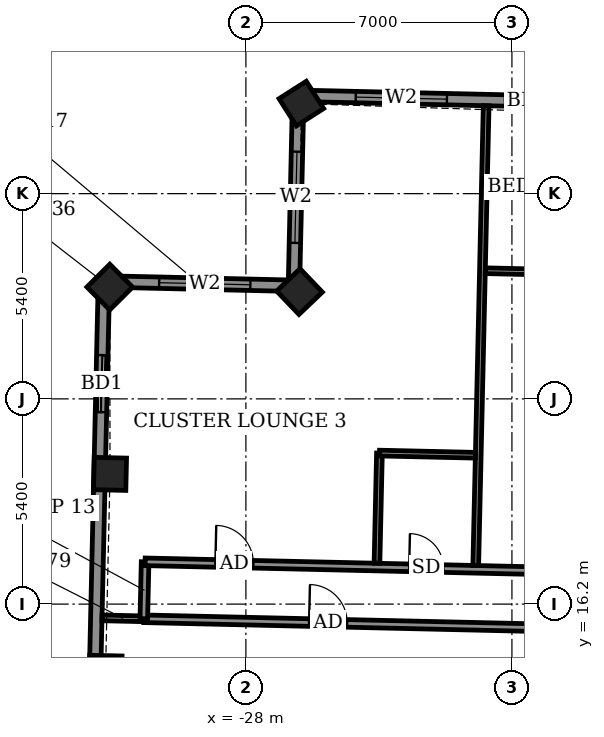
"""IFC4 building model, lengths in metres.
Left out: names, types, materials, properties, quantities, classifications, styles, units other than length and angle.
Written with IfcOpenShell. Run it as: python <this file> out.ifc"""

import sys

from ifc_helpers import new_model, si_unit, direction, frame, frame_2d, origin, origin_2d, place, context, subcontext, project, spatial, rectangle, extrude, element, fill, save


model = new_model("IFC4")
c1 = context("Model", 3, precision=1e-05, world=origin(), true_north=direction((0.0, 1.0)))
c2 = subcontext(c1, "Body", "Model", "MODEL_VIEW")
j1 = project(units=[si_unit("LENGTHUNIT", "METRE"), si_unit("PLANEANGLEUNIT", "RADIAN")], contexts=[c1])
p1 = place(None, origin())
s1 = spatial("IfcSite", under=j1, at=p1, CompositionType="ELEMENT")
p2 = place(p1, origin())
s2 = spatial("IfcBuilding", under=s1, at=p2, CompositionType="ELEMENT")
p3 = place(p2, frame((0.0, 0.0, 316.9)))
s3 = spatial("IfcBuildingStorey", under=s2, at=p3, CompositionType="ELEMENT", Elevation=316.9)
for number, where, z_axis, x_axis in (
    (1, (-26.541, 29.37, -0.55), (0.0, 0.0, 1.0), (-0.843, -0.538, 0.0)),
    (2, (-26.589, 24.423, -0.55), (0.0, 0.0, 1.0), (-0.723, -0.691, 0.0)),
    (3, (-31.582, 24.542, -0.55), (0.0, 0.0, 1.0), (-0.709, -0.706, 0.0)),
    (4, (-31.575, 19.626, -0.55), (0.0, 0.0, 1.0), (-0.023, -1.0, 0.0)),
    (5, (-31.693, 14.419, -0.55), (0.0, 0.0, 1.0), (-0.023, -1.0, 0.0)),
):
    element("IfcColumn", number, at=place(p3, frame(where, z_axis=z_axis, x_axis=x_axis)), inside=s3, PredefinedType="COLUMN", context=c2, shape_type="SweptSolid", body=[
        extrude(rectangle(XDim=0.85, YDim=0.85, at=origin_2d()), origin(), (0.0, 0.0, 1.0), 3.6),
    ])
p4 = place(p3, frame((25.264, 28.397, 0.0), z_axis=(0.0, 0.0, 1.0), x_axis=(-0.999742391375, 0.022696935658, 0.0)))
e6 = element("IfcWall", 6, at=p4, inside=s3, PredefinedType="SOLIDWALL", context=c2, shape_type="SweptSolid", body=[
    extrude(rectangle(XDim=51.9, YDim=0.3, at=frame_2d((25.95, 0.0))), origin(), (0.0, 0.0, 1.0), 2.45),
])
p5 = place(p4, frame((0.874, 0.0, 0.0)))
e7 = element("IfcOpeningElement", 7, at=p5, cuts=e6, PredefinedType="OPENING", context=c2, shape_type="SweptSolid", body=[
    extrude(rectangle(XDim=1.5, YDim=2.4, at=frame_2d((0.75, 1.2))), frame((0.0, 0.16, 0.0), z_axis=(0.0, -1.0, 0.0), x_axis=(1.0, 0.0, 0.0)), (0.0, 0.0, 1.0), 0.32),
])
p6 = place(p4, frame((4.241, 0.0, 0.0)))
e8 = element("IfcOpeningElement", 8, at=p6, cuts=e6, PredefinedType="OPENING", context=c2, shape_type="SweptSolid", body=[
    extrude(rectangle(XDim=1.5, YDim=2.4, at=frame_2d((0.75, 1.2))), frame((0.0, 0.16, 0.0), z_axis=(0.0, -1.0, 0.0), x_axis=(1.0, 0.0, 0.0)), (0.0, 0.0, 1.0), 0.32),
])
p7 = place(p4, frame((8.691, 0.0, 0.0)))
e9 = element("IfcOpeningElement", 9, at=p7, cuts=e6, PredefinedType="OPENING", context=c2, shape_type="SweptSolid", body=[
    extrude(rectangle(XDim=1.5, YDim=2.4, at=frame_2d((0.75, 1.2))), frame((0.0, 0.16, 0.0), z_axis=(0.0, -1.0, 0.0), x_axis=(1.0, 0.0, 0.0)), (0.0, 0.0, 1.0), 0.32),
])
p8 = place(p4, frame((12.245, 0.0, 0.0)))
e10 = element("IfcOpeningElement", 10, at=p8, cuts=e6, PredefinedType="OPENING", context=c2, shape_type="SweptSolid", body=[
    extrude(rectangle(XDim=1.5, YDim=2.4, at=frame_2d((0.75, 1.2))), frame((0.0, 0.16, 0.0), z_axis=(0.0, -1.0, 0.0), x_axis=(1.0, 0.0, 0.0)), (0.0, 0.0, 1.0), 0.32),
])
p9 = place(p4, frame((17.25, 0.0, 0.0)))
e11 = element("IfcOpeningElement", 11, at=p9, cuts=e6, PredefinedType="OPENING", context=c2, shape_type="SweptSolid", body=[
    extrude(rectangle(XDim=1.5, YDim=2.4, at=frame_2d((0.75, 1.2))), frame((0.0, 0.16, 0.0), z_axis=(0.0, -1.0, 0.0), x_axis=(1.0, 0.0, 0.0)), (0.0, 0.0, 1.0), 0.32),
])
p10 = place(p4, frame((22.874, 0.0, 0.0)))
e12 = element("IfcOpeningElement", 12, at=p10, cuts=e6, PredefinedType="OPENING", context=c2, shape_type="SweptSolid", body=[
    extrude(rectangle(XDim=1.2, YDim=2.4, at=frame_2d((0.6, 1.2))), frame((0.0, 0.16, 0.0), z_axis=(0.0, -1.0, 0.0), x_axis=(1.0, 0.0, 0.0)), (0.0, 0.0, 1.0), 0.32),
])
p11 = place(p4, frame((26.1, 0.0, 0.0)))
e13 = element("IfcOpeningElement", 13, at=p11, cuts=e6, PredefinedType="OPENING", context=c2, shape_type="SweptSolid", body=[
    extrude(rectangle(XDim=1.5, YDim=2.4, at=frame_2d((0.75, 1.2))), frame((0.0, 0.16, 0.0), z_axis=(0.0, -1.0, 0.0), x_axis=(1.0, 0.0, 0.0)), (0.0, 0.0, 1.0), 0.32),
])
p12 = place(p4, frame((30.977, 0.0, 0.0)))
e14 = element("IfcOpeningElement", 14, at=p12, cuts=e6, PredefinedType="OPENING", context=c2, shape_type="SweptSolid", body=[
    extrude(rectangle(XDim=1.5, YDim=2.4, at=frame_2d((0.75, 1.2))), frame((0.0, 0.16, 0.0), z_axis=(0.0, -1.0, 0.0), x_axis=(1.0, 0.0, 0.0)), (0.0, 0.0, 1.0), 0.32),
])
p13 = place(p4, frame((34.53, 0.0, 0.0)))
e15 = element("IfcOpeningElement", 15, at=p13, cuts=e6, PredefinedType="OPENING", context=c2, shape_type="SweptSolid", body=[
    extrude(rectangle(XDim=1.5, YDim=2.4, at=frame_2d((0.75, 1.2))), frame((0.0, 0.16, 0.0), z_axis=(0.0, -1.0, 0.0), x_axis=(1.0, 0.0, 0.0)), (0.0, 0.0, 1.0), 0.32),
])
p14 = place(p4, frame((39.425, 0.0, 0.0)))
e16 = element("IfcOpeningElement", 16, at=p14, cuts=e6, PredefinedType="OPENING", context=c2, shape_type="SweptSolid", body=[
    extrude(rectangle(XDim=1.5, YDim=2.4, at=frame_2d((0.75, 1.2))), frame((0.0, 0.16, 0.0), z_axis=(0.0, -1.0, 0.0), x_axis=(1.0, 0.0, 0.0)), (0.0, 0.0, 1.0), 0.32),
])
p15 = place(p4, frame((45.259, 0.0, 0.0)))
e17 = element("IfcOpeningElement", 17, at=p15, cuts=e6, PredefinedType="OPENING", context=c2, shape_type="SweptSolid", body=[
    extrude(rectangle(XDim=1.2, YDim=2.4, at=frame_2d((0.6, 1.2))), frame((0.0, 0.16, 0.0), z_axis=(0.0, -1.0, 0.0), x_axis=(1.0, 0.0, 0.0)), (0.0, 0.0, 1.0), 0.32),
])
p16 = place(p4, frame((47.987, 0.0, 0.9)))
e18 = element("IfcOpeningElement", 18, at=p16, cuts=e6, PredefinedType="OPENING", context=c2, shape_type="SweptSolid", body=[
    extrude(rectangle(XDim=2.4, YDim=1.5, at=frame_2d((1.2, 0.75))), frame((0.0, 0.16, 0.0), z_axis=(0.0, -1.0, 0.0), x_axis=(1.0, 0.0, 0.0)), (0.0, 0.0, 1.0), 0.32),
])
p17 = place(p3, frame((-26.623, 29.575, 0.0), z_axis=(0.0, 0.0, 1.0), x_axis=(-0.022606059803, -0.999744450377, 0.0)))
e19 = element("IfcWall", 19, at=p17, inside=s3, PredefinedType="SOLIDWALL", context=c2, shape_type="SweptSolid", body=[
    extrude(rectangle(XDim=5.0, YDim=0.3, at=frame_2d((2.5, 0.0))), origin(), (0.0, 0.0, 1.0), 2.55),
])
p18 = place(p17, frame((1.471, 0.0, 0.9)))
e20 = element("IfcOpeningElement", 20, at=p18, cuts=e19, PredefinedType="OPENING", context=c2, shape_type="SweptSolid", body=[
    extrude(rectangle(XDim=2.4, YDim=1.5, at=frame_2d((1.2, 0.75))), frame((0.0, 0.16, 0.0), z_axis=(0.0, -1.0, 0.0), x_axis=(1.0, 0.0, 0.0)), (0.0, 0.0, 1.0), 0.32),
])
p19 = place(p3, frame((-26.736, 24.576, 0.0), z_axis=(0.0, 0.0, 1.0), x_axis=(-0.999740017489, 0.022801259434, 0.0)))
e21 = element("IfcWall", 21, at=p19, inside=s3, PredefinedType="SOLIDWALL", context=c2, shape_type="SweptSolid", body=[
    extrude(rectangle(XDim=5.0, YDim=0.3, at=frame_2d((2.5, 0.0))), origin(), (0.0, 0.0, 1.0), 2.55),
])
p20 = place(p19, frame((1.147, 0.0, 0.9)))
e22 = element("IfcOpeningElement", 22, at=p20, cuts=e21, PredefinedType="OPENING", context=c2, shape_type="SweptSolid", body=[
    extrude(rectangle(XDim=2.4, YDim=1.5, at=frame_2d((1.2, 0.75))), frame((0.0, 0.16, 0.0), z_axis=(0.0, -1.0, 0.0), x_axis=(1.0, 0.0, 0.0)), (0.0, 0.0, 1.0), 0.32),
])
p21 = place(p3, frame((-31.735, 24.69, 0.0), z_axis=(0.0, 0.0, 1.0), x_axis=(-0.022694199758, -0.999742453484, 0.0)))
e23 = element("IfcWall", 23, at=p21, inside=s3, PredefinedType="SOLIDWALL", context=c2, shape_type="SweptSolid", body=[
    extrude(rectangle(XDim=15.9, YDim=0.3, at=frame_2d((7.95, 0.0))), origin(), (0.0, 0.0, 1.0), 2.55),
])
p22 = place(p21, frame((1.939, 0.0, 0.0)))
e24 = element("IfcOpeningElement", 24, at=p22, cuts=e23, PredefinedType="OPENING", context=c2, shape_type="SweptSolid", body=[
    extrude(rectangle(XDim=1.5, YDim=2.4, at=frame_2d((0.75, 1.2))), frame((0.0, 0.16, 0.0), z_axis=(0.0, -1.0, 0.0), x_axis=(1.0, 0.0, 0.0)), (0.0, 0.0, 1.0), 0.32),
])
p23 = place(p21, frame((11.671, 0.0, 0.9)))
e25 = element("IfcOpeningElement", 25, at=p23, cuts=e23, PredefinedType="OPENING", context=c2, shape_type="SweptSolid", body=[
    extrude(rectangle(XDim=2.4, YDim=1.5, at=frame_2d((1.2, 0.75))), frame((0.0, 0.16, 0.0), z_axis=(0.0, -1.0, 0.0), x_axis=(1.0, 0.0, 0.0)), (0.0, 0.0, 1.0), 0.32),
])
p24 = place(p3, frame((-31.786, 15.838, 0.0), z_axis=(0.0, 0.0, 1.0), x_axis=(0.999745701647, -0.022550654924, 0.0)))
e26 = element("IfcWall", 26, at=p24, inside=s3, PredefinedType="PARTITIONING", context=c2, shape_type="SweptSolid", body=[
    extrude(rectangle(XDim=1.104, YDim=0.15, at=frame_2d((0.552, 0.0))), origin(), (0.0, 0.0, 1.0), 2.55),
])
p25 = place(p3, frame((-30.686, 15.814, 0.0), z_axis=(0.0, 0.0, 1.0), x_axis=(0.999742346277, -0.022698921993, 0.0)))
e27 = element("IfcWall", 27, at=p25, inside=s3, PredefinedType="PARTITIONING", context=c2, shape_type="SweptSolid", body=[
    extrude(rectangle(XDim=11.1, YDim=0.2, at=frame_2d((5.55, 0.0))), origin(), (0.0, 0.0, 1.0), 3.05),
])
p26 = place(p25, frame((4.35, 0.0, 0.0)))
e28 = element("IfcOpeningElement", 28, at=p26, cuts=e27, PredefinedType="OPENING", context=c2, shape_type="SweptSolid", body=[
    extrude(rectangle(XDim=1.0, YDim=2.1, at=frame_2d((0.5, 1.05))), frame((0.0, 0.11, 0.0), z_axis=(0.0, -1.0, 0.0), x_axis=(1.0, 0.0, 0.0)), (0.0, 0.0, 1.0), 0.22),
])
p27 = place(p3, frame((-30.686, 15.814, 0.0), z_axis=(0.0, 0.0, 1.0), x_axis=(0.022632637625, 0.99974384905, 0.0)))
e29 = element("IfcWall", 29, at=p27, inside=s3, PredefinedType="PARTITIONING", context=c2, shape_type="SweptSolid", body=[
    extrude(rectangle(XDim=1.5, YDim=0.2, at=frame_2d((0.75, 0.0))), origin(), (0.0, 0.0, 1.0), 3.05),
])
p28 = place(p3, frame((-30.652, 17.313, 0.0), z_axis=(0.0, 0.0, 1.0), x_axis=(0.999742623764, -0.02268669719, 0.0)))
e30 = element("IfcWall", 30, at=p28, inside=s3, PredefinedType="PARTITIONING", context=c2, shape_type="SweptSolid", body=[
    extrude(rectangle(XDim=58.8, YDim=0.2, at=frame_2d((29.4, 0.0))), origin(), (0.0, 0.0, 1.0), 3.05),
])
p29 = place(p28, frame((55.698, 0.0, 0.0)))
e31 = element("IfcOpeningElement", 31, at=p29, cuts=e30, PredefinedType="OPENING", context=c2, shape_type="SweptSolid", body=[
    extrude(rectangle(XDim=1.0, YDim=2.1, at=frame_2d((0.5, 1.05))), frame((0.0, 0.11, 0.0), z_axis=(0.0, -1.0, 0.0), x_axis=(1.0, 0.0, 0.0)), (0.0, 0.0, 1.0), 0.22),
])
p30 = place(p28, frame((49.0, 0.0, 0.0)))
e32 = element("IfcOpeningElement", 32, at=p30, cuts=e30, PredefinedType="OPENING", context=c2, shape_type="SweptSolid", body=[
    extrude(rectangle(XDim=0.9, YDim=2.1, at=frame_2d((0.45, 1.05))), frame((0.0, 0.11, 0.0), z_axis=(0.0, -1.0, 0.0), x_axis=(1.0, 0.0, 0.0)), (0.0, 0.0, 1.0), 0.22),
])
p31 = place(p28, frame((47.125, 0.0, 0.0)))
e33 = element("IfcOpeningElement", 33, at=p31, cuts=e30, PredefinedType="OPENING", context=c2, shape_type="SweptSolid", body=[
    extrude(rectangle(XDim=0.9, YDim=2.1, at=frame_2d((0.45, 1.05))), frame((0.0, 0.11, 0.0), z_axis=(0.0, -1.0, 0.0), x_axis=(1.0, 0.0, 0.0)), (0.0, 0.0, 1.0), 0.22),
])
p32 = place(p28, frame((40.425, 0.0, 0.0)))
e34 = element("IfcOpeningElement", 34, at=p32, cuts=e30, PredefinedType="OPENING", context=c2, shape_type="SweptSolid", body=[
    extrude(rectangle(XDim=0.9, YDim=2.1, at=frame_2d((0.45, 1.05))), frame((0.0, 0.11, 0.0), z_axis=(0.0, -1.0, 0.0), x_axis=(1.0, 0.0, 0.0)), (0.0, 0.0, 1.0), 0.22),
])
p33 = place(p28, frame((38.4, 0.0, 0.0)))
e35 = element("IfcOpeningElement", 35, at=p33, cuts=e30, PredefinedType="OPENING", context=c2, shape_type="SweptSolid", body=[
    extrude(rectangle(XDim=0.9, YDim=2.1, at=frame_2d((0.45, 1.05))), frame((0.0, 0.11, 0.0), z_axis=(0.0, -1.0, 0.0), x_axis=(1.0, 0.0, 0.0)), (0.0, 0.0, 1.0), 0.22),
])
p34 = place(p28, frame((31.6, 0.0, 0.0)))
e36 = element("IfcOpeningElement", 36, at=p34, cuts=e30, PredefinedType="OPENING", context=c2, shape_type="SweptSolid", body=[
    extrude(rectangle(XDim=0.9, YDim=2.1, at=frame_2d((0.45, 1.05))), frame((0.0, 0.11, 0.0), z_axis=(0.0, -1.0, 0.0), x_axis=(1.0, 0.0, 0.0)), (0.0, 0.0, 1.0), 0.22),
])
p35 = place(p28, frame((29.55, 0.0, 0.0)))
e37 = element("IfcOpeningElement", 37, at=p35, cuts=e30, PredefinedType="OPENING", context=c2, shape_type="SweptSolid", body=[
    extrude(rectangle(XDim=0.9, YDim=2.1, at=frame_2d((0.45, 1.05))), frame((0.0, 0.11, 0.0), z_axis=(0.0, -1.0, 0.0), x_axis=(1.0, 0.0, 0.0)), (0.0, 0.0, 1.0), 0.22),
])
p36 = place(p28, frame((22.625, 0.0, 0.0)))
e38 = element("IfcOpeningElement", 38, at=p36, cuts=e30, PredefinedType="OPENING", context=c2, shape_type="SweptSolid", body=[
    extrude(rectangle(XDim=0.9, YDim=2.1, at=frame_2d((0.45, 1.05))), frame((0.0, 0.11, 0.0), z_axis=(0.0, -1.0, 0.0), x_axis=(1.0, 0.0, 0.0)), (0.0, 0.0, 1.0), 0.22),
])
p37 = place(p28, frame((20.625, 0.0, 0.0)))
e39 = element("IfcOpeningElement", 39, at=p37, cuts=e30, PredefinedType="OPENING", context=c2, shape_type="SweptSolid", body=[
    extrude(rectangle(XDim=0.9, YDim=2.1, at=frame_2d((0.45, 1.05))), frame((0.0, 0.11, 0.0), z_axis=(0.0, -1.0, 0.0), x_axis=(1.0, 0.0, 0.0)), (0.0, 0.0, 1.0), 0.22),
])
p38 = place(p28, frame((13.825, 0.0, 0.0)))
e40 = element("IfcOpeningElement", 40, at=p38, cuts=e30, PredefinedType="OPENING", context=c2, shape_type="SweptSolid", body=[
    extrude(rectangle(XDim=0.9, YDim=2.1, at=frame_2d((0.45, 1.05))), frame((0.0, 0.11, 0.0), z_axis=(0.0, -1.0, 0.0), x_axis=(1.0, 0.0, 0.0)), (0.0, 0.0, 1.0), 0.22),
])
p39 = place(p28, frame((11.725, 0.0, 0.0)))
e41 = element("IfcOpeningElement", 41, at=p39, cuts=e30, PredefinedType="OPENING", context=c2, shape_type="SweptSolid", body=[
    extrude(rectangle(XDim=0.9, YDim=2.1, at=frame_2d((0.45, 1.05))), frame((0.0, 0.11, 0.0), z_axis=(0.0, -1.0, 0.0), x_axis=(1.0, 0.0, 0.0)), (0.0, 0.0, 1.0), 0.22),
])
p40 = place(p28, frame((1.85, 0.0, 0.0)))
e42 = element("IfcOpeningElement", 42, at=p40, cuts=e30, PredefinedType="OPENING", context=c2, shape_type="SweptSolid", body=[
    extrude(rectangle(XDim=1.0, YDim=2.1, at=frame_2d((0.5, 1.05))), frame((0.0, 0.11, 0.0), z_axis=(0.0, -1.0, 0.0), x_axis=(1.0, 0.0, 0.0)), (0.0, 0.0, 1.0), 0.22),
])
p41 = place(p28, frame((6.95, 0.0, 0.0)))
e43 = element("IfcOpeningElement", 43, at=p41, cuts=e30, PredefinedType="OPENING", context=c2, shape_type="SweptSolid", body=[
    extrude(rectangle(XDim=0.9, YDim=2.1, at=frame_2d((0.45, 1.05))), frame((0.0, 0.11, 0.0), z_axis=(0.0, -1.0, 0.0), x_axis=(1.0, 0.0, 0.0)), (0.0, 0.0, 1.0), 0.22),
])
p42 = place(p3, frame((-24.551, 17.275, 0.0), z_axis=(0.0, 0.0, 1.0), x_axis=(0.022394382402, 0.999749214372, 0.0)))
e44 = element("IfcWall", 44, at=p42, inside=s3, PredefinedType="PARTITIONING", context=c2, shape_type="SweptSolid", body=[
    extrude(rectangle(XDim=2.9, YDim=0.15, at=frame_2d((1.45, 0.0))), origin(), (0.0, 0.0, 1.0), 3.05),
])
p43 = place(p3, frame((-21.952, 17.216, 0.0), z_axis=(0.0, 0.0, 1.0), x_axis=(0.02263844782, 0.9997437175, 0.0)))
e45 = element("IfcWall", 45, at=p43, inside=s3, PredefinedType="PARTITIONING", context=c2, shape_type="SweptSolid", body=[
    extrude(rectangle(XDim=12.1, YDim=0.15, at=frame_2d((6.05, 0.0))), origin(), (0.0, 0.0, 1.0), 2.5),
])
p44 = place(p3, frame((-24.486, 20.174, 0.0), z_axis=(0.0, 0.0, 1.0), x_axis=(0.999744175585, -0.022618209135, 0.0)))
e46 = element("IfcWall", 46, at=p44, inside=s3, PredefinedType="PARTITIONING", context=c2, shape_type="SweptSolid", body=[
    extrude(rectangle(XDim=2.526, YDim=0.15, at=frame_2d((1.263, 0.0))), origin(), (0.0, 0.0, 1.0), 3.05),
])
p45 = place(p3, frame((-21.701, 24.972, 0.0), z_axis=(0.0, 0.0, 1.0), x_axis=(0.999740260747, -0.02279059109, 0.0)))
e47 = element("IfcWall", 47, at=p45, inside=s3, PredefinedType="PARTITIONING", context=c2, shape_type="SweptSolid", body=[
    extrude(rectangle(XDim=2.324, YDim=0.15, at=frame_2d((1.162, 0.0))), origin(), (0.0, 0.0, 1.0), 3.05),
])
p46 = place(p15, origin())
e48 = element("IfcDoor", 48, at=p46, inside=s3, OperationType="SLIDING_TO_LEFT", PredefinedType="DOOR", context=c2, shape_type="SweptSolid", body=[
    extrude(rectangle(XDim=1.2, YDim=2.4, at=frame_2d((0.6, 1.2))), frame((0.0, 0.025, 0.0), z_axis=(0.0, -1.0, 0.0), x_axis=(1.0, 0.0, 0.0)), (0.0, 0.0, 1.0), 0.05),
])
fill(e17, e48)
p47 = place(p16, origin())
e49 = element("IfcWindow", 49, at=p47, inside=s3, PartitioningType="DOUBLE_PANEL_VERTICAL", PredefinedType="WINDOW", context=c2, shape_type="SweptSolid", body=[
    extrude(rectangle(XDim=2.4, YDim=1.5, at=frame_2d((1.2, 0.75))), frame((0.0, 0.03, 0.0), z_axis=(0.0, -1.0, 0.0), x_axis=(1.0, 0.0, 0.0)), (0.0, 0.0, 1.0), 0.06),
])
fill(e18, e49)
p48 = place(p18, origin())
e50 = element("IfcWindow", 50, at=p48, inside=s3, PartitioningType="DOUBLE_PANEL_VERTICAL", PredefinedType="WINDOW", context=c2, shape_type="SweptSolid", body=[
    extrude(rectangle(XDim=2.4, YDim=1.5, at=frame_2d((1.2, 0.75))), frame((0.0, 0.03, 0.0), z_axis=(0.0, -1.0, 0.0), x_axis=(1.0, 0.0, 0.0)), (0.0, 0.0, 1.0), 0.06),
])
fill(e20, e50)
p49 = place(p20, origin())
e51 = element("IfcWindow", 51, at=p49, inside=s3, PartitioningType="DOUBLE_PANEL_VERTICAL", PredefinedType="WINDOW", context=c2, shape_type="SweptSolid", body=[
    extrude(rectangle(XDim=2.4, YDim=1.5, at=frame_2d((1.2, 0.75))), frame((0.0, 0.03, 0.0), z_axis=(0.0, -1.0, 0.0), x_axis=(1.0, 0.0, 0.0)), (0.0, 0.0, 1.0), 0.06),
])
fill(e22, e51)
p50 = place(p22, origin())
e52 = element("IfcDoor", 52, at=p50, inside=s3, OperationType="SLIDING_TO_LEFT", PredefinedType="DOOR", context=c2, shape_type="SweptSolid", body=[
    extrude(rectangle(XDim=1.5, YDim=2.4, at=frame_2d((0.75, 1.2))), frame((0.0, 0.025, 0.0), z_axis=(0.0, -1.0, 0.0), x_axis=(1.0, 0.0, 0.0)), (0.0, 0.0, 1.0), 0.05),
])
fill(e24, e52)
p51 = place(p40, origin())
e53 = element("IfcDoor", 53, at=p51, inside=s3, OperationType="SINGLE_SWING_RIGHT", PredefinedType="DOOR", context=c2, shape_type="SweptSolid", body=[
    extrude(rectangle(XDim=1.0, YDim=2.1, at=frame_2d((0.5, 1.05))), frame((0.0, 0.025, 0.0), z_axis=(0.0, -1.0, 0.0), x_axis=(1.0, 0.0, 0.0)), (0.0, 0.0, 1.0), 0.05),
])
fill(e42, e53)
p52 = place(p41, origin())
e54 = element("IfcDoor", 54, at=p52, inside=s3, OperationType="SINGLE_SWING_RIGHT", PredefinedType="DOOR", context=c2, shape_type="SweptSolid", body=[
    extrude(rectangle(XDim=0.9, YDim=2.1, at=frame_2d((0.45, 1.05))), frame((0.0, 0.025, 0.0), z_axis=(0.0, -1.0, 0.0), x_axis=(1.0, 0.0, 0.0)), (0.0, 0.0, 1.0), 0.05),
])
fill(e43, e54)
p53 = place(p26, origin())
e55 = element("IfcDoor", 55, at=p53, inside=s3, OperationType="SINGLE_SWING_LEFT", PredefinedType="DOOR", context=c2, shape_type="SweptSolid", body=[
    extrude(rectangle(XDim=1.0, YDim=2.1, at=frame_2d((0.5, 1.05))), frame((0.0, 0.025, 0.0), z_axis=(0.0, -1.0, 0.0), x_axis=(1.0, 0.0, 0.0)), (0.0, 0.0, 1.0), 0.05),
])
fill(e28, e55)
save(model, sys.argv[1])
